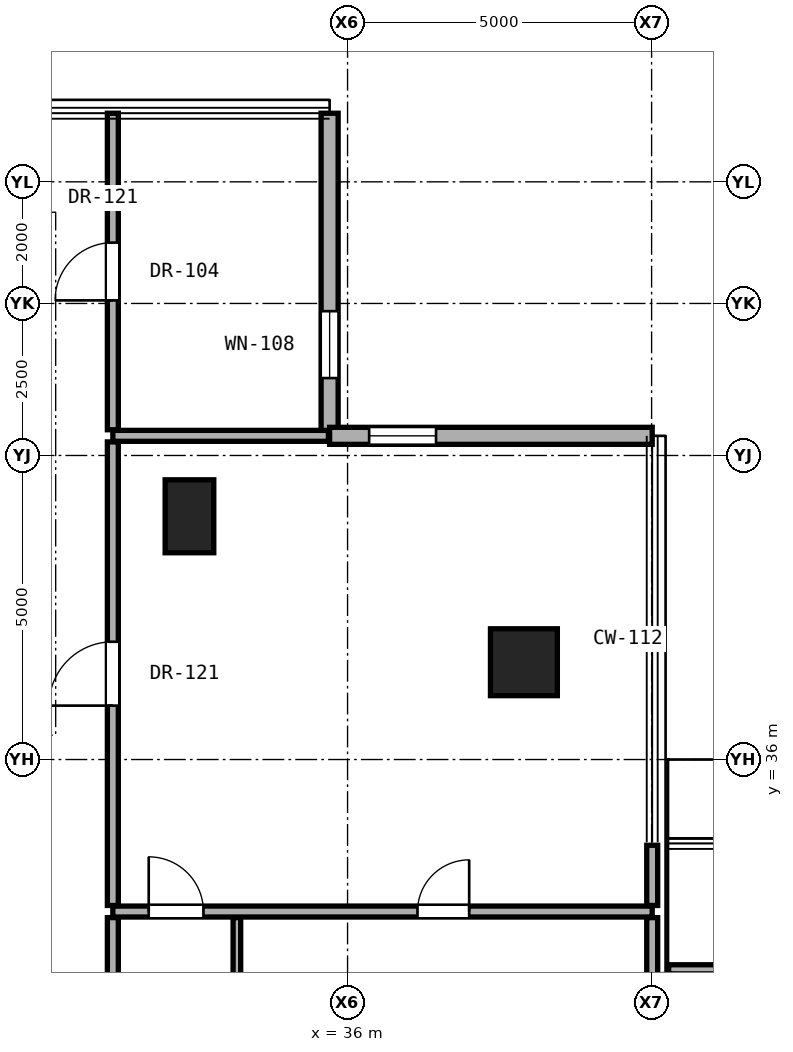
"""IFC4 building model, lengths in metres.
Left out: names, types, materials, properties, quantities, classifications, styles, units other than length and angle.
Written with IfcOpenShell. Run it as: python <this file> out.ifc"""

import sys

from ifc_helpers import new_model, si_unit, direction, frame, frame_2d, origin, origin_2d, place, context, subcontext, project, spatial, rectangle, hollow_rectangle, extrude, element, fill, save


model = new_model("IFC4")
c1 = context("Model", 3, precision=1e-05, world=origin(), true_north=direction((0.0, 1.0)))
c2 = subcontext(c1, "Body", "Model", "MODEL_VIEW")
j1 = project(units=[si_unit("LENGTHUNIT", "METRE"), si_unit("PLANEANGLEUNIT", "RADIAN")], contexts=[c1])
p1 = place(None, origin())
s1 = spatial("IfcSite", under=j1, at=p1, CompositionType="ELEMENT")
p2 = place(p1, origin())
s2 = spatial("IfcBuilding", under=s1, at=p2, CompositionType="ELEMENT")
p3 = place(p2, frame((0.0, 0.0, 91.7)))
s3 = spatial("IfcBuildingStorey", under=s2, at=p3, CompositionType="ELEMENT", Elevation=91.7)
p4 = place(p3, frame((38.9, 37.6, 0.0), z_axis=(0.0, 0.0, 1.0), x_axis=(1.0, 0.0, 0.0)))
e1 = element("IfcColumn", 1, at=p4, inside=s3, PredefinedType="COLUMN", context=c2, shape_type="SweptSolid", body=[
    extrude(hollow_rectangle(XDim=1.1, YDim=1.1, WallThickness=0.06, at=origin_2d()), origin(), (0.0, 0.0, 1.0), 3.3),
])
p5 = place(p3, frame((33.4, 40.0, 0.0), z_axis=(0.0, 0.0, 1.0), x_axis=(1.0, 0.0, 0.0)))
e2 = element("IfcColumn", 2, at=p5, inside=s3, PredefinedType="PILASTER", context=c2, shape_type="SweptSolid", body=[
    extrude(rectangle(XDim=0.8, YDim=1.2, at=origin_2d()), origin(), (0.0, 0.0, 1.0), 3.3),
])
p6 = place(p3, frame((35.705, 41.323, 0.0), z_axis=(0.0, 0.0, 1.0), x_axis=(0.0, 1.0, 0.0)))
e3 = element("IfcWall", 3, at=p6, inside=s3, PredefinedType="SOLIDWALL", context=c2, shape_type="SweptSolid", body=[
    extrude(rectangle(XDim=5.305, YDim=0.28, at=frame_2d((2.652, 0.0))), origin(), (0.0, 0.0, 1.0), 3.06),
])
p7 = place(p6, frame((0.95, 0.0, 0.85)))
e4 = element("IfcOpeningElement", 4, at=p7, cuts=e3, PredefinedType="OPENING", context=c2, shape_type="SweptSolid", body=[
    extrude(rectangle(XDim=1.1, YDim=2.0, at=frame_2d((0.55, 1.0))), frame((0.0, 0.15, 0.0), z_axis=(0.0, -1.0, 0.0), x_axis=(1.0, 0.0, 0.0)), (0.0, 0.0, 1.0), 0.3),
])
p8 = place(p3, frame((41.01, 41.323, 0.0), z_axis=(0.0, 0.0, 1.0), x_axis=(-1.0, 0.0, 0.0)))
e5 = element("IfcWall", 5, at=p8, inside=s3, PredefinedType="SOLIDWALL", context=c2, shape_type="SweptSolid", body=[
    extrude(rectangle(XDim=5.305, YDim=0.28, at=frame_2d((2.652, 0.0))), origin(), (0.0, 0.0, 1.0), 3.06),
])
p9 = place(p8, frame((3.555, 0.0, 0.85)))
e6 = element("IfcOpeningElement", 6, at=p9, cuts=e5, PredefinedType="OPENING", context=c2, shape_type="SweptSolid", body=[
    extrude(rectangle(XDim=1.1, YDim=2.0, at=frame_2d((0.55, 1.0))), frame((0.0, 0.15, 0.0), z_axis=(0.0, -1.0, 0.0), x_axis=(1.0, 0.0, 0.0)), (0.0, 0.0, 1.0), 0.3),
])
p10 = place(p3, frame((41.28, 32.55, 0.0), z_axis=(0.0, 0.0, 1.0), x_axis=(1.0, 0.0, 0.0)))
e7 = element("IfcWall", 7, at=p10, inside=s3, PredefinedType="PARTITIONING", context=c2, shape_type="SweptSolid", body=[
    extrude(rectangle(XDim=5.62, YDim=0.15, at=frame_2d((2.81, 0.0))), origin(), (0.0, 0.0, 1.0), 2.316),
])
p11 = place(p3, frame((32.14, 33.5, 0.0), z_axis=(0.0, 0.0, 1.0), x_axis=(1.0, 0.0, 0.0)))
e8 = element("IfcWall", 8, at=p11, inside=s3, PredefinedType="PARTITIONING", context=c2, shape_type="SweptSolid", body=[
    extrude(rectangle(XDim=8.87, YDim=0.18, at=frame_2d((4.435, 0.0))), origin(), (0.0, 0.0, 1.0), 2.145),
])
p12 = place(p11, frame((5.01, 0.0, 0.0)))
e9 = element("IfcOpeningElement", 9, at=p12, cuts=e8, PredefinedType="OPENING", context=c2, shape_type="SweptSolid", body=[
    extrude(rectangle(XDim=0.85, YDim=2.01, at=frame_2d((0.425, 1.005))), frame((0.0, 0.1, 0.0), z_axis=(0.0, -1.0, 0.0), x_axis=(1.0, 0.0, 0.0)), (0.0, 0.0, 1.0), 0.2),
])
p13 = place(p11, frame((0.59, 0.0, 0.0)))
e10 = element("IfcOpeningElement", 10, at=p13, cuts=e8, PredefinedType="OPENING", context=c2, shape_type="SweptSolid", body=[
    extrude(rectangle(XDim=0.9, YDim=2.1, at=frame_2d((0.45, 1.05))), frame((0.0, 0.1, 0.0), z_axis=(0.0, -1.0, 0.0), x_axis=(1.0, 0.0, 0.0)), (0.0, 0.0, 1.0), 0.2),
])
p14 = place(p3, frame((32.14, 41.323, 0.0), z_axis=(0.0, 0.0, 1.0), x_axis=(1.0, 0.0, 0.0)))
e11 = element("IfcWall", 11, at=p14, inside=s3, PredefinedType="PARTITIONING", context=c2, shape_type="SweptSolid", body=[
    extrude(rectangle(XDim=3.545, YDim=0.18, at=frame_2d((1.772, 0.0))), origin(), (0.0, 0.0, 1.0), 3.08),
])
p15 = place(p3, frame((32.14, 31.272, 0.0), z_axis=(0.0, 0.0, 1.0), x_axis=(0.0, 1.0, 0.0)))
e12 = element("IfcWall", 12, at=p15, inside=s3, PredefinedType="PARTITIONING", context=c2, shape_type="SweptSolid", body=[
    extrude(rectangle(XDim=2.127, YDim=0.18, at=frame_2d((1.064, 0.0))), origin(), (0.0, 0.0, 1.0), 2.299),
])
p16 = place(p3, frame((32.14, 33.6, 0.0), z_axis=(0.0, 0.0, 1.0), x_axis=(0.0, 1.0, 0.0)))
e13 = element("IfcWall", 13, at=p16, inside=s3, PredefinedType="PARTITIONING", context=c2, shape_type="SweptSolid", body=[
    extrude(rectangle(XDim=7.623, YDim=0.18, at=frame_2d((3.812, 0.0))), origin(), (0.0, 0.0, 1.0), 2.456),
])
p17 = place(p16, frame((3.287, 0.0, 0.0)))
e14 = element("IfcOpeningElement", 14, at=p17, cuts=e13, PredefinedType="OPENING", context=c2, shape_type="SweptSolid", body=[
    extrude(rectangle(XDim=1.05, YDim=2.2, at=frame_2d((0.525, 1.1))), frame((0.0, 0.1, 0.0), z_axis=(0.0, -1.0, 0.0), x_axis=(1.0, 0.0, 0.0)), (0.0, 0.0, 1.0), 0.2),
])
p18 = place(p3, frame((32.14, 41.423, 0.0), z_axis=(0.0, 0.0, 1.0), x_axis=(0.0, 1.0, 0.0)))
e15 = element("IfcWall", 15, at=p18, inside=s3, PredefinedType="PARTITIONING", context=c2, shape_type="SweptSolid", body=[
    extrude(rectangle(XDim=5.205, YDim=0.18, at=frame_2d((2.603, 0.0))), origin(), (0.0, 0.0, 1.0), 3.08),
])
p19 = place(p18, frame((2.127, 0.0, 0.0)))
e16 = element("IfcOpeningElement", 16, at=p19, cuts=e15, PredefinedType="OPENING", context=c2, shape_type="SweptSolid", body=[
    extrude(rectangle(XDim=0.95, YDim=2.15, at=frame_2d((0.475, 1.075))), frame((0.0, 0.1, 0.0), z_axis=(0.0, -1.0, 0.0), x_axis=(1.0, 0.0, 0.0)), (0.0, 0.0, 1.0), 0.2),
])
p20 = place(p3, frame((34.18, 31.272, 0.0), z_axis=(0.0, 0.0, 1.0), x_axis=(0.0, 1.0, 0.0)))
e17 = element("IfcWall", 17, at=p20, inside=s3, PredefinedType="PARTITIONING", context=c2, shape_type="SweptSolid", body=[
    extrude(rectangle(XDim=2.127, YDim=0.125, at=frame_2d((1.064, 0.0))), origin(), (0.0, 0.0, 1.0), 2.299),
])
p21 = place(p3, frame((41.01, 31.272, 0.0), z_axis=(0.0, 0.0, 1.0), x_axis=(0.0, 1.0, 0.0)))
e18 = element("IfcWall", 18, at=p21, inside=s3, PredefinedType="PARTITIONING", context=c2, shape_type="SweptSolid", body=[
    extrude(rectangle(XDim=2.127, YDim=0.18, at=frame_2d((1.064, 0.0))), origin(), (0.0, 0.0, 1.0), 2.085),
])
p22 = place(p3, frame((41.01, 33.6, 0.0), z_axis=(0.0, 0.0, 1.0), x_axis=(0.0, 1.0, 0.0)))
e19 = element("IfcWall", 19, at=p22, inside=s3, PredefinedType="PARTITIONING", context=c2, shape_type="SweptSolid", body=[
    extrude(rectangle(XDim=0.99, YDim=0.18, at=frame_2d((0.495, 0.0))), origin(), (0.0, 0.0, 1.0), 2.085),
])
p23 = place(p7, origin())
e20 = element("IfcWindow", 20, at=p23, inside=s3, PartitioningType="SINGLE_PANEL", PredefinedType="WINDOW", context=c2, shape_type="SweptSolid", body=[
    extrude(rectangle(XDim=1.1, YDim=2.0, at=frame_2d((0.55, 1.0))), frame((0.0, 0.03, 0.0), z_axis=(0.0, -1.0, 0.0), x_axis=(1.0, 0.0, 0.0)), (0.0, 0.0, 1.0), 0.06),
])
fill(e4, e20)
p24 = place(p9, origin())
e21 = element("IfcWindow", 21, at=p24, inside=s3, PartitioningType="SINGLE_PANEL", PredefinedType="WINDOW", context=c2, shape_type="SweptSolid", body=[
    extrude(rectangle(XDim=1.1, YDim=2.0, at=frame_2d((0.55, 1.0))), frame((0.0, 0.03, 0.0), z_axis=(0.0, -1.0, 0.0), x_axis=(1.0, 0.0, 0.0)), (0.0, 0.0, 1.0), 0.06),
])
fill(e6, e21)
p25 = place(p17, origin())
e22 = element("IfcDoor", 22, at=p25, inside=s3, OperationType="SINGLE_SWING_LEFT", PredefinedType="DOOR", context=c2, shape_type="SweptSolid", body=[
    extrude(rectangle(XDim=1.05, YDim=2.2, at=frame_2d((0.525, 1.1))), frame((0.0, 0.025, 0.0), z_axis=(0.0, -1.0, 0.0), x_axis=(1.0, 0.0, 0.0)), (0.0, 0.0, 1.0), 0.05),
])
fill(e14, e22)
p26 = place(p12, origin())
e23 = element("IfcDoor", 23, at=p26, inside=s3, OperationType="SINGLE_SWING_RIGHT", PredefinedType="DOOR", context=c2, shape_type="SweptSolid", body=[
    extrude(rectangle(XDim=0.85, YDim=2.01, at=frame_2d((0.425, 1.005))), frame((0.0, 0.025, 0.0), z_axis=(0.0, -1.0, 0.0), x_axis=(1.0, 0.0, 0.0)), (0.0, 0.0, 1.0), 0.05),
])
fill(e9, e23)
p27 = place(p13, origin())
e24 = element("IfcDoor", 24, at=p27, inside=s3, OperationType="SINGLE_SWING_LEFT", PredefinedType="DOOR", context=c2, shape_type="SweptSolid", body=[
    extrude(rectangle(XDim=0.9, YDim=2.1, at=frame_2d((0.45, 1.05))), frame((0.0, 0.025, 0.0), z_axis=(0.0, -1.0, 0.0), x_axis=(1.0, 0.0, 0.0)), (0.0, 0.0, 1.0), 0.05),
])
fill(e10, e24)
p28 = place(p19, origin())
e25 = element("IfcDoor", 25, at=p28, inside=s3, OperationType="SINGLE_SWING_LEFT", PredefinedType="DOOR", context=c2, shape_type="SweptSolid", body=[
    extrude(rectangle(XDim=0.95, YDim=2.15, at=frame_2d((0.475, 1.075))), frame((0.0, 0.025, 0.0), z_axis=(0.0, -1.0, 0.0), x_axis=(1.0, 0.0, 0.0)), (0.0, 0.0, 1.0), 0.05),
])
fill(e16, e25)
save(model, sys.argv[1])
